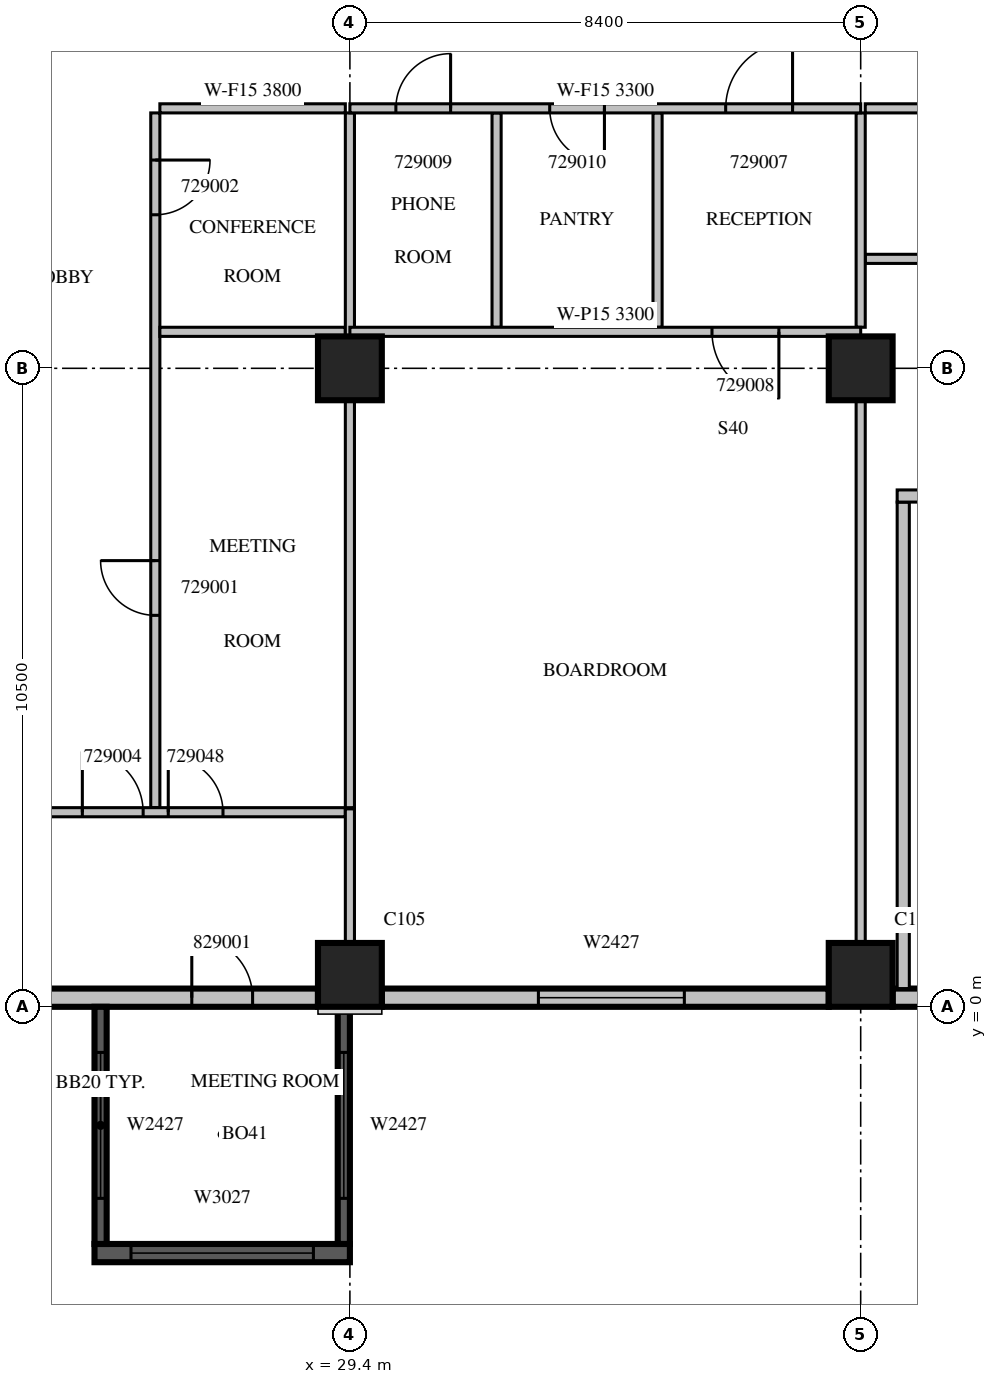
"""IFC4 building model, lengths in metres.
Left out: names, types, materials, properties, quantities, classifications, styles, units other than length and angle.
Written with IfcOpenShell. Run it as: python <this file> out.ifc"""

import sys

from ifc_helpers import new_model, si_unit, direction, frame, frame_2d, origin, origin_2d, place, context, subcontext, project, spatial, rectangle, extrude, source, transform, mapped, element, fill, save


model = new_model("IFC4")
c1 = context("Model", 3, precision=1e-05, world=origin(), true_north=direction((0.0, 1.0)))
c2 = subcontext(c1, "Body", "Model", "MODEL_VIEW")
j1 = project(units=[si_unit("LENGTHUNIT", "METRE"), si_unit("PLANEANGLEUNIT", "RADIAN")], contexts=[c1])
p1 = place(None, origin())
s1 = spatial("IfcSite", under=j1, at=p1, CompositionType="ELEMENT")
p2 = place(p1, origin())
s2 = spatial("IfcBuilding", under=s1, at=p2, CompositionType="ELEMENT")
p3 = place(p2, frame((0.0, 0.0, 132.9)))
s3 = spatial("IfcBuildingStorey", under=s2, at=p3, CompositionType="ELEMENT", Elevation=132.9)
m1 = source(origin(), c2, "Body", "SweptSolid", [
    extrude(rectangle(XDim=1.05, YDim=1.05, at=origin_2d()), origin(), (0.0, 0.0, 1.0), 4.2),
])
for number, where, z_axis, x_axis in (
    (1, (29.4, 0.525, 0.0), (0.0, 0.0, 1.0), (1.0, 0.0, 0.0)),
    (2, (37.8, 0.525, 0.0), (0.0, 0.0, 1.0), (1.0, 0.0, 0.0)),
    (3, (29.4, 10.5, 0.0), (0.0, 0.0, 1.0), (1.0, 0.0, 0.0)),
    (4, (37.8, 10.5, 0.0), (0.0, 0.0, 1.0), (1.0, 0.0, 0.0)),
):
    element("IfcColumn", number, at=place(p3, frame(where, z_axis=z_axis, x_axis=x_axis)), inside=s3, PredefinedType="COLUMN", context=c2, shape_type="MappedRepresentation", body=[
        mapped(m1, transform((0.0, 0.0, 0.0), scale=1.0)),
    ])
m2 = source(origin(), c2, "Body", "SweptSolid", [
    extrude(rectangle(XDim=7.35, YDim=0.3, at=frame_2d((3.675, 0.0))), origin(), (0.0, 0.0, 1.0), 3.8),
])
p4 = place(p3, frame((21.525, 0.15, 0.0), z_axis=(0.0, 0.0, 1.0), x_axis=(1.0, 0.0, 0.0)))
e5 = element("IfcWall", 5, at=p4, inside=s3, PredefinedType="STANDARD", context=c2, shape_type="MappedRepresentation", body=[
    mapped(m2, transform((0.0, 0.0, 0.0), scale=1.0)),
])
m3 = source(origin(), c2, "Body", "SweptSolid", [
    extrude(rectangle(XDim=2.4, YDim=2.7, at=frame_2d((1.2, 1.35))), frame((0.0, 0.16, 0.0), z_axis=(0.0, -1.0, 0.0), x_axis=(1.0, 0.0, 0.0)), (0.0, 0.0, 1.0), 0.32),
])
p5 = place(p4, frame((0.375, 0.0, 0.6)))
e6 = element("IfcOpeningElement", 6, at=p5, cuts=e5, PredefinedType="OPENING", context=c2, shape_type="MappedRepresentation", body=[
    mapped(m3, transform((0.0, 0.0, 0.0), scale=1.0)),
])
m4 = source(origin(), c2, "Body", "SweptSolid", [
    extrude(rectangle(XDim=1.0, YDim=2.1, at=frame_2d((0.5, 1.05))), frame((0.0, 0.16, 0.0), z_axis=(0.0, -1.0, 0.0), x_axis=(1.0, 0.0, 0.0)), (0.0, 0.0, 1.0), 0.32),
])
p6 = place(p4, frame((5.275, 0.0, 0.0)))
e7 = element("IfcOpeningElement", 7, at=p6, cuts=e5, PredefinedType="OPENING", context=c2, shape_type="MappedRepresentation", body=[
    mapped(m4, transform((0.0, 0.0, 0.0), scale=1.0)),
])
p7 = place(p3, frame((29.925, 0.15, 0.0), z_axis=(0.0, 0.0, 1.0), x_axis=(1.0, 0.0, 0.0)))
e8 = element("IfcWall", 8, at=p7, inside=s3, PredefinedType="STANDARD", context=c2, shape_type="MappedRepresentation", body=[
    mapped(m2, transform((0.0, 0.0, 0.0), scale=1.0)),
])
p8 = place(p7, frame((2.575, 0.0, 0.6)))
e9 = element("IfcOpeningElement", 9, at=p8, cuts=e8, PredefinedType="OPENING", context=c2, shape_type="MappedRepresentation", body=[
    mapped(m3, transform((0.0, 0.0, 0.0), scale=1.0)),
])
m5 = source(origin(), c2, "Body", "SweptSolid", [
    extrude(rectangle(XDim=1.875, YDim=0.3, at=frame_2d((0.938, 0.0))), origin(), (0.0, 0.0, 1.0), 3.8),
])
p9 = place(p3, frame((38.325, 0.15, 0.0), z_axis=(0.0, 0.0, 1.0), x_axis=(1.0, 0.0, 0.0)))
e10 = element("IfcWall", 10, at=p9, inside=s3, PredefinedType="STANDARD", context=c2, shape_type="MappedRepresentation", body=[
    mapped(m5, transform((0.0, 0.0, 0.0), scale=1.0)),
])
m6 = source(origin(), c2, "Body", "SweptSolid", [
    extrude(rectangle(XDim=4.2, YDim=0.3, at=frame_2d((2.1, 0.0))), origin(), (0.0, 0.0, 1.0), 3.79),
])
p10 = place(p3, frame((25.2, -4.05, 0.0), z_axis=(0.0, 0.0, 1.0), x_axis=(1.0, 0.0, 0.0)))
e11 = element("IfcWall", 11, at=p10, inside=s3, PredefinedType="SOLIDWALL", context=c2, shape_type="MappedRepresentation", body=[
    mapped(m6, transform((0.0, 0.0, 0.0), scale=1.0)),
])
m7 = source(origin(), c2, "Body", "SweptSolid", [
    extrude(rectangle(XDim=3.0, YDim=2.7, at=frame_2d((1.5, 1.35))), frame((0.0, 0.16, 0.0), z_axis=(0.0, -1.0, 0.0), x_axis=(1.0, 0.0, 0.0)), (0.0, 0.0, 1.0), 0.32),
])
p11 = place(p10, frame((0.6, 0.0, 0.6)))
e12 = element("IfcOpeningElement", 12, at=p11, cuts=e11, PredefinedType="OPENING", context=c2, shape_type="MappedRepresentation", body=[
    mapped(m7, transform((0.0, 0.0, 0.0), scale=1.0)),
])
m8 = source(origin(), c2, "Body", "SweptSolid", [
    extrude(rectangle(XDim=3.9, YDim=0.2, at=frame_2d((1.95, 0.0))), origin(), (0.0, 0.0, 1.0), 3.79),
])
p12 = place(p3, frame((25.3, 0.0, 0.0), z_axis=(0.0, 0.0, 1.0), x_axis=(0.0, -1.0, 0.0)))
e13 = element("IfcWall", 13, at=p12, inside=s3, PredefinedType="SOLIDWALL", context=c2, shape_type="MappedRepresentation", body=[
    mapped(m8, transform((0.0, 0.0, 0.0), scale=1.0)),
])
m9 = source(origin(), c2, "Body", "SweptSolid", [
    extrude(rectangle(XDim=2.4, YDim=2.7, at=frame_2d((1.2, 1.35))), frame((0.0, 0.11, 0.0), z_axis=(0.0, -1.0, 0.0), x_axis=(1.0, 0.0, 0.0)), (0.0, 0.0, 1.0), 0.22),
])
p13 = place(p12, frame((0.75, 0.0, 0.6)))
e14 = element("IfcOpeningElement", 14, at=p13, cuts=e13, PredefinedType="OPENING", context=c2, shape_type="MappedRepresentation", body=[
    mapped(m9, transform((0.0, 0.0, 0.0), scale=1.0)),
])
p14 = place(p3, frame((29.3, 0.0, 0.0), z_axis=(0.0, 0.0, 1.0), x_axis=(0.0, -1.0, 0.0)))
e15 = element("IfcWall", 15, at=p14, inside=s3, PredefinedType="SOLIDWALL", context=c2, shape_type="MappedRepresentation", body=[
    mapped(m8, transform((0.0, 0.0, 0.0), scale=1.0)),
])
p15 = place(p14, frame((0.75, 0.0, 0.6)))
e16 = element("IfcOpeningElement", 16, at=p15, cuts=e15, PredefinedType="OPENING", context=c2, shape_type="MappedRepresentation", body=[
    mapped(m9, transform((0.0, 0.0, 0.0), scale=1.0)),
])
m10 = source(origin(), c2, "Body", "SweptSolid", [
    extrude(rectangle(XDim=8.0, YDim=0.2, at=frame_2d((4.0, 0.0))), origin(), (0.0, 0.0, 1.0), 3.8),
])
p16 = place(p3, frame((38.5, 0.3, 0.0), z_axis=(0.0, 0.0, 1.0), x_axis=(0.0, 1.0, 0.0)))
e17 = element("IfcWall", 17, at=p16, inside=s3, PredefinedType="PARTITIONING", context=c2, shape_type="MappedRepresentation", body=[
    mapped(m10, transform((0.0, 0.0, 0.0), scale=1.0)),
])
m11 = source(origin(), c2, "Body", "SweptSolid", [
    extrude(rectangle(XDim=5.45, YDim=0.2, at=frame_2d((2.725, 0.0))), origin(), (0.0, 0.0, 1.0), 3.8),
])
p17 = place(p3, frame((38.4, 8.4, 0.0), z_axis=(0.0, 0.0, 1.0), x_axis=(1.0, 0.0, 0.0)))
e18 = element("IfcWall", 18, at=p17, inside=s3, PredefinedType="PARTITIONING", context=c2, shape_type="MappedRepresentation", body=[
    mapped(m11, transform((0.0, 0.0, 0.0), scale=1.0)),
])
m12 = source(origin(), c2, "Body", "SweptSolid", [
    extrude(rectangle(XDim=1.2, YDim=2.1, at=frame_2d((0.6, 1.05))), frame((0.0, 0.11, 0.0), z_axis=(0.0, -1.0, 0.0), x_axis=(1.0, 0.0, 0.0)), (0.0, 0.0, 1.0), 0.22),
])
p18 = place(p17, frame((0.4, 0.0, 0.0)))
e19 = element("IfcOpeningElement", 19, at=p18, cuts=e18, PredefinedType="OPENING", context=c2, shape_type="MappedRepresentation", body=[
    mapped(m12, transform((0.0, 0.0, 0.0), scale=1.0)),
])
m13 = source(origin(), c2, "Body", "SweptSolid", [
    extrude(rectangle(XDim=0.9, YDim=2.1, at=frame_2d((0.45, 1.05))), frame((0.0, 0.11, 0.0), z_axis=(0.0, -1.0, 0.0), x_axis=(1.0, 0.0, 0.0)), (0.0, 0.0, 1.0), 0.22),
])
p19 = place(p17, frame((3.25, 0.0, 0.0)))
e20 = element("IfcOpeningElement", 20, at=p19, cuts=e18, PredefinedType="OPENING", context=c2, shape_type="MappedRepresentation", body=[
    mapped(m13, transform((0.0, 0.0, 0.0), scale=1.0)),
])
m14 = source(origin(), c2, "Body", "SweptSolid", [
    extrude(rectangle(XDim=11.425, YDim=0.15, at=frame_2d((5.713, 0.0))), origin(), (0.0, 0.0, 1.0), 3.8),
])
p20 = place(p3, frame((26.2, 14.7, 0.0), z_axis=(0.0, 0.0, 1.0), x_axis=(0.0, -1.0, 0.0)))
e21 = element("IfcWall", 21, at=p20, inside=s3, PredefinedType="PARTITIONING", context=c2, shape_type="MappedRepresentation", body=[
    mapped(m14, transform((0.0, 0.0, 0.0), scale=1.0)),
])
m15 = source(origin(), c2, "Body", "SweptSolid", [
    extrude(rectangle(XDim=0.9, YDim=2.1, at=frame_2d((0.45, 1.05))), frame((0.0, 0.085, 0.0), z_axis=(0.0, -1.0, 0.0), x_axis=(1.0, 0.0, 0.0)), (0.0, 0.0, 1.0), 0.17),
])
p21 = place(p20, frame((7.362, 0.0, 0.0)))
e22 = element("IfcOpeningElement", 22, at=p21, cuts=e21, PredefinedType="OPENING", context=c2, shape_type="MappedRepresentation", body=[
    mapped(m15, transform((0.0, 0.0, 0.0), scale=1.0)),
])
p22 = place(p20, frame((0.775, 0.0, 0.0)))
e23 = element("IfcOpeningElement", 23, at=p22, cuts=e21, PredefinedType="OPENING", context=c2, shape_type="MappedRepresentation", body=[
    mapped(m15, transform((0.0, 0.0, 0.0), scale=1.0)),
])
m16 = source(origin(), c2, "Body", "SweptSolid", [
    extrude(rectangle(XDim=3.05, YDim=0.15, at=frame_2d((1.525, 0.0))), origin(), (0.0, 0.0, 1.0), 3.8),
])
for number, where, z_axis, x_axis in (
    (24, (29.325, 11.1, 0.0), (0.0, 0.0, 1.0), (-1.0, 0.0, 0.0)),
    (25, (29.325, 14.775, 0.0), (0.0, 0.0, 1.0), (-1.0, 0.0, 0.0)),
):
    element("IfcWall", number, at=place(p3, frame(where, z_axis=z_axis, x_axis=x_axis)), inside=s3, PredefinedType="PARTITIONING", context=c2, shape_type="MappedRepresentation", body=[
        mapped(m16, transform((0.0, 0.0, 0.0), scale=1.0)),
    ])
m17 = source(origin(), c2, "Body", "SweptSolid", [
    extrude(rectangle(XDim=6.701, YDim=0.15, at=frame_2d((3.35, 0.0))), origin(), (0.0, 0.0, 1.0), 3.8),
])
p23 = place(p3, frame((29.4, 3.275, 0.0), z_axis=(0.0, 0.0, 1.0), x_axis=(0.0, 1.0, 0.0)))
e26 = element("IfcWall", 26, at=p23, inside=s3, PredefinedType="PARTITIONING", context=c2, shape_type="MappedRepresentation", body=[
    mapped(m17, transform((0.0, 0.0, 0.0), scale=1.0)),
])
m18 = source(origin(), c2, "Body", "SweptSolid", [
    extrude(rectangle(XDim=3.676, YDim=0.15, at=frame_2d((1.838, 0.0))), origin(), (0.0, 0.0, 1.0), 3.8),
])
p24 = place(p3, frame((29.4, 11.024, 0.0), z_axis=(0.0, 0.0, 1.0), x_axis=(0.0, 1.0, 0.0)))
e27 = element("IfcWall", 27, at=p24, inside=s3, PredefinedType="PARTITIONING", context=c2, shape_type="MappedRepresentation", body=[
    mapped(m18, transform((0.0, 0.0, 0.0), scale=1.0)),
])
m19 = source(origin(), c2, "Body", "SweptSolid", [
    extrude(rectangle(XDim=7.325, YDim=0.15, at=frame_2d((3.663, 0.0))), origin(), (0.0, 0.0, 1.0), 3.8),
])
p25 = place(p3, frame((22.0, 3.2, 0.0), z_axis=(0.0, 0.0, 1.0), x_axis=(1.0, 0.0, 0.0)))
e28 = element("IfcWall", 28, at=p25, inside=s3, PredefinedType="PARTITIONING", context=c2, shape_type="MappedRepresentation", body=[
    mapped(m19, transform((0.0, 0.0, 0.0), scale=1.0)),
])
m20 = source(origin(), c2, "Body", "SweptSolid", [
    extrude(rectangle(XDim=1.0, YDim=2.1, at=frame_2d((0.5, 1.05))), frame((0.0, 0.085, 0.0), z_axis=(0.0, -1.0, 0.0), x_axis=(1.0, 0.0, 0.0)), (0.0, 0.0, 1.0), 0.17),
])
p26 = place(p25, frame((3.0, 0.0, 0.0)))
e29 = element("IfcOpeningElement", 29, at=p26, cuts=e28, PredefinedType="OPENING", context=c2, shape_type="MappedRepresentation", body=[
    mapped(m20, transform((0.0, 0.0, 0.0), scale=1.0)),
])
p27 = place(p25, frame((4.413, 0.0, 0.0)))
e30 = element("IfcOpeningElement", 30, at=p27, cuts=e28, PredefinedType="OPENING", context=c2, shape_type="MappedRepresentation", body=[
    mapped(m15, transform((0.0, 0.0, 0.0), scale=1.0)),
])
m21 = source(origin(), c2, "Body", "SweptSolid", [
    extrude(rectangle(XDim=6.45, YDim=0.15, at=frame_2d((3.225, 0.0))), origin(), (0.0, 0.0, 1.0), 3.3),
])
p28 = place(p3, frame((37.875, 12.3, 0.0), z_axis=(0.0, 0.0, 1.0), x_axis=(1.0, 0.0, 0.0)))
e31 = element("IfcWall", 31, at=p28, inside=s3, PredefinedType="PARTITIONING", context=c2, shape_type="MappedRepresentation", body=[
    mapped(m21, transform((0.0, 0.0, 0.0), scale=1.0)),
])
p29 = place(p3, frame((44.325, 14.775, 0.0), z_axis=(0.0, 0.0, 1.0), x_axis=(-1.0, 0.0, 0.0)))
e32 = element("IfcWall", 32, at=p29, inside=s3, PredefinedType="PARTITIONING", context=c2, shape_type="MappedRepresentation", body=[
    mapped(m21, transform((0.0, 0.0, 0.0), scale=1.0)),
])
p30 = place(p29, frame((2.812, 0.0, 0.0)))
e33 = element("IfcOpeningElement", 33, at=p30, cuts=e32, PredefinedType="OPENING", context=c2, shape_type="MappedRepresentation", body=[
    mapped(m15, transform((0.0, 0.0, 0.0), scale=1.0)),
])
m22 = source(origin(), c2, "Body", "SweptSolid", [
    extrude(rectangle(XDim=3.525, YDim=0.15, at=frame_2d((1.762, 0.0))), origin(), (0.0, 0.0, 1.0), 3.8),
])
for number, where, z_axis, x_axis in (
    (34, (31.812, 11.175, 0.0), (0.0, 0.0, 1.0), (0.0, 1.0, 0.0)),
    (35, (34.459, 11.175, 0.0), (0.0, 0.0, 1.0), (0.0, 1.0, 0.0)),
):
    element("IfcWall", number, at=place(p3, frame(where, z_axis=z_axis, x_axis=x_axis)), inside=s3, PredefinedType="PARTITIONING", context=c2, shape_type="MappedRepresentation", body=[
        mapped(m22, transform((0.0, 0.0, 0.0), scale=1.0)),
    ])
m23 = source(origin(), c2, "Body", "SweptSolid", [
    extrude(rectangle(XDim=2.206, YDim=0.15, at=frame_2d((1.103, 0.0))), origin(), (0.0, 0.0, 1.0), 3.8),
])
p31 = place(p3, frame((29.4, 1.049, 0.0), z_axis=(0.0, 0.0, 1.0), x_axis=(0.0, 1.0, 0.0)))
e36 = element("IfcWall", 36, at=p31, inside=s3, PredefinedType="PARTITIONING", context=c2, shape_type="MappedRepresentation", body=[
    mapped(m23, transform((0.0, 0.0, 0.0), scale=1.0)),
])
m24 = source(origin(), c2, "Body", "SweptSolid", [
    extrude(rectangle(XDim=8.927, YDim=0.15, at=frame_2d((4.463, 0.0))), origin(), (0.0, 0.0, 1.0), 3.8),
])
p32 = place(p3, frame((37.8, 1.049, 0.0), z_axis=(0.0, 0.0, 1.0), x_axis=(0.0, 1.0, 0.0)))
e37 = element("IfcWall", 37, at=p32, inside=s3, PredefinedType="PARTITIONING", context=c2, shape_type="MappedRepresentation", body=[
    mapped(m24, transform((0.0, 0.0, 0.0), scale=1.0)),
])
p33 = place(p3, frame((37.8, 11.175, 0.0), z_axis=(0.0, 0.0, 1.0), x_axis=(0.0, 1.0, 0.0)))
e38 = element("IfcWall", 38, at=p33, inside=s3, PredefinedType="PARTITIONING", context=c2, shape_type="MappedRepresentation", body=[
    mapped(m22, transform((0.0, 0.0, 0.0), scale=1.0)),
])
m25 = source(origin(), c2, "Body", "SweptSolid", [
    extrude(rectangle(XDim=8.4, YDim=0.15, at=frame_2d((4.2, 0.0))), origin(), (0.0, 0.0, 1.0), 3.3),
])
p34 = place(p3, frame((37.8, 11.1, 0.0), z_axis=(0.0, 0.0, 1.0), x_axis=(-1.0, 0.0, 0.0)))
e39 = element("IfcWall", 39, at=p34, inside=s3, PredefinedType="PARTITIONING", context=c2, shape_type="MappedRepresentation", body=[
    mapped(m25, transform((0.0, 0.0, 0.0), scale=1.0)),
])
m26 = source(origin(), c2, "Body", "SweptSolid", [
    extrude(rectangle(XDim=1.1, YDim=2.1, at=frame_2d((0.55, 1.05))), frame((0.0, 0.085, 0.0), z_axis=(0.0, -1.0, 0.0), x_axis=(1.0, 0.0, 0.0)), (0.0, 0.0, 1.0), 0.17),
])
p35 = place(p34, frame((1.345, 0.0, 0.0)))
e40 = element("IfcOpeningElement", 40, at=p35, cuts=e39, PredefinedType="OPENING", context=c2, shape_type="MappedRepresentation", body=[
    mapped(m26, transform((0.0, 0.0, 0.0), scale=1.0)),
])
p36 = place(p3, frame((37.8, 14.775, 0.0), z_axis=(0.0, 0.0, 1.0), x_axis=(-1.0, 0.0, 0.0)))
e41 = element("IfcWall", 41, at=p36, inside=s3, PredefinedType="PARTITIONING", context=c2, shape_type="MappedRepresentation", body=[
    mapped(m25, transform((0.0, 0.0, 0.0), scale=1.0)),
])
p37 = place(p36, frame((1.12, 0.0, 0.0)))
e42 = element("IfcOpeningElement", 42, at=p37, cuts=e41, PredefinedType="OPENING", context=c2, shape_type="MappedRepresentation", body=[
    mapped(m26, transform((0.0, 0.0, 0.0), scale=1.0)),
])
p38 = place(p36, frame((6.744, 0.0, 0.0)))
e43 = element("IfcOpeningElement", 43, at=p38, cuts=e41, PredefinedType="OPENING", context=c2, shape_type="MappedRepresentation", body=[
    mapped(m15, transform((0.0, 0.0, 0.0), scale=1.0)),
])
p39 = place(p36, frame((4.214, 0.0, 0.0)))
e44 = element("IfcOpeningElement", 44, at=p39, cuts=e41, PredefinedType="OPENING", context=c2, shape_type="MappedRepresentation", body=[
    mapped(m15, transform((0.0, 0.0, 0.0), scale=1.0)),
])
m27 = source(origin(), c2, "Body", "SweptSolid", [
    extrude(rectangle(XDim=2.4, YDim=2.7, at=frame_2d((1.2, 1.35))), frame((0.0, 0.03, 0.0), z_axis=(0.0, -1.0, 0.0), x_axis=(1.0, 0.0, 0.0)), (0.0, 0.0, 1.0), 0.06),
])
p40 = place(p8, origin())
e45 = element("IfcWindow", 45, at=p40, inside=s3, PartitioningType="SINGLE_PANEL", PredefinedType="WINDOW", context=c2, shape_type="MappedRepresentation", body=[
    mapped(m27, transform((0.0, 0.0, 0.0), scale=1.0)),
])
fill(e9, e45)
m28 = source(origin(), c2, "Body", "SweptSolid", [
    extrude(rectangle(XDim=3.0, YDim=2.7, at=frame_2d((1.5, 1.35))), frame((0.0, 0.03, 0.0), z_axis=(0.0, -1.0, 0.0), x_axis=(1.0, 0.0, 0.0)), (0.0, 0.0, 1.0), 0.06),
])
p41 = place(p11, origin())
e46 = element("IfcWindow", 46, at=p41, inside=s3, PartitioningType="SINGLE_PANEL", PredefinedType="WINDOW", context=c2, shape_type="MappedRepresentation", body=[
    mapped(m28, transform((0.0, 0.0, 0.0), scale=1.0)),
])
fill(e12, e46)
p42 = place(p13, origin())
e47 = element("IfcWindow", 47, at=p42, inside=s3, PartitioningType="SINGLE_PANEL", PredefinedType="WINDOW", context=c2, shape_type="MappedRepresentation", body=[
    mapped(m27, transform((0.0, 0.0, 0.0), scale=1.0)),
])
fill(e14, e47)
p43 = place(p15, origin())
e48 = element("IfcWindow", 48, at=p43, inside=s3, PartitioningType="SINGLE_PANEL", PredefinedType="WINDOW", context=c2, shape_type="MappedRepresentation", body=[
    mapped(m27, transform((0.0, 0.0, 0.0), scale=1.0)),
])
fill(e16, e48)
m29 = source(origin(), c2, "Body", "SweptSolid", [
    extrude(rectangle(XDim=0.9, YDim=2.1, at=frame_2d((0.45, 1.05))), frame((0.0, 0.025, 0.0), z_axis=(0.0, -1.0, 0.0), x_axis=(1.0, 0.0, 0.0)), (0.0, 0.0, 1.0), 0.05),
])
p44 = place(p21, origin())
e49 = element("IfcDoor", 49, at=p44, inside=s3, OperationType="SINGLE_SWING_RIGHT", PredefinedType="DOOR", context=c2, shape_type="MappedRepresentation", body=[
    mapped(m29, transform((0.0, 0.0, 0.0), scale=1.0)),
])
fill(e22, e49)
p45 = place(p22, origin())
e50 = element("IfcDoor", 50, at=p45, inside=s3, OperationType="SINGLE_SWING_LEFT", PredefinedType="DOOR", context=c2, shape_type="MappedRepresentation", body=[
    mapped(m29, transform((0.0, 0.0, 0.0), scale=1.0)),
])
fill(e23, e50)
m30 = source(origin(), c2, "Body", "SweptSolid", [
    extrude(rectangle(XDim=1.0, YDim=2.1, at=frame_2d((0.5, 1.05))), frame((0.0, 0.025, 0.0), z_axis=(0.0, -1.0, 0.0), x_axis=(1.0, 0.0, 0.0)), (0.0, 0.0, 1.0), 0.05),
])
p46 = place(p26, origin())
e51 = element("IfcDoor", 51, at=p46, inside=s3, OperationType="SINGLE_SWING_LEFT", PredefinedType="DOOR", context=c2, shape_type="MappedRepresentation", body=[
    mapped(m30, transform((0.0, 0.0, 0.0), scale=1.0)),
])
fill(e29, e51)
m31 = source(origin(), c2, "Body", "SweptSolid", [
    extrude(rectangle(XDim=1.1, YDim=2.1, at=frame_2d((0.55, 1.05))), frame((0.0, 0.025, 0.0), z_axis=(0.0, -1.0, 0.0), x_axis=(1.0, 0.0, 0.0)), (0.0, 0.0, 1.0), 0.05),
])
p47 = place(p37, origin())
e52 = element("IfcDoor", 52, at=p47, inside=s3, OperationType="SINGLE_SWING_RIGHT", PredefinedType="DOOR", context=c2, shape_type="MappedRepresentation", body=[
    mapped(m31, transform((0.0, 0.0, 0.0), scale=1.0)),
])
fill(e42, e52)
p48 = place(p35, origin())
e53 = element("IfcDoor", 53, at=p48, inside=s3, OperationType="SINGLE_SWING_LEFT", PredefinedType="DOOR", context=c2, shape_type="MappedRepresentation", body=[
    mapped(m31, transform((0.0, 0.0, 0.0), scale=1.0)),
])
fill(e40, e53)
p49 = place(p38, origin())
e54 = element("IfcDoor", 54, at=p49, inside=s3, OperationType="SINGLE_SWING_RIGHT", PredefinedType="DOOR", context=c2, shape_type="MappedRepresentation", body=[
    mapped(m29, transform((0.0, 0.0, 0.0), scale=1.0)),
])
fill(e43, e54)
p50 = place(p39, origin())
e55 = element("IfcDoor", 55, at=p50, inside=s3, OperationType="SINGLE_SWING_LEFT", PredefinedType="DOOR", context=c2, shape_type="MappedRepresentation", body=[
    mapped(m29, transform((0.0, 0.0, 0.0), scale=1.0)),
])
fill(e44, e55)
p51 = place(p27, origin())
e56 = element("IfcDoor", 56, at=p51, inside=s3, OperationType="SINGLE_SWING_LEFT", PredefinedType="DOOR", context=c2, shape_type="MappedRepresentation", body=[
    mapped(m29, transform((0.0, 0.0, 0.0), scale=1.0)),
])
fill(e30, e56)
p52 = place(p6, origin())
e57 = element("IfcDoor", 57, at=p52, inside=s3, OperationType="SINGLE_SWING_LEFT", PredefinedType="DOOR", context=c2, shape_type="MappedRepresentation", body=[
    mapped(m30, transform((0.0, 0.0, 0.0), scale=1.0)),
])
fill(e7, e57)
save(model, sys.argv[1])
